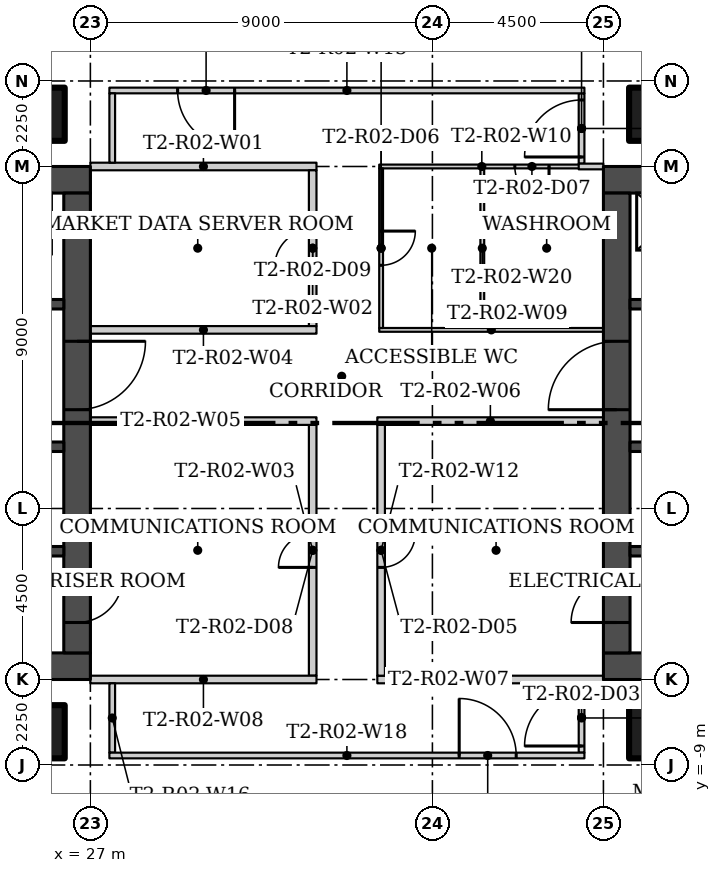
"""IFC4 building model, lengths in metres.
Left out: names, types, materials, properties, quantities, classifications, styles, units other than length and angle.
Written with IfcOpenShell. Run it as: python <this file> out.ifc"""

import sys

from ifc_helpers import new_model, si_unit, direction, frame, frame_2d, origin, origin_2d, place, context, subcontext, project, spatial, rectangle, hollow_rectangle, extrude, element, fill, save


model = new_model("IFC4")
c1 = context("Model", 3, precision=1e-05, world=origin(), true_north=direction((0.0, 1.0)))
c2 = subcontext(c1, "Body", "Model", "MODEL_VIEW")
j1 = project(units=[si_unit("LENGTHUNIT", "METRE"), si_unit("PLANEANGLEUNIT", "RADIAN")], contexts=[c1])
p1 = place(None, origin())
s1 = spatial("IfcSite", under=j1, at=p1, CompositionType="ELEMENT")
p2 = place(p1, origin())
s2 = spatial("IfcBuilding", under=s1, at=p2, CompositionType="ELEMENT")
p3 = place(p2, frame((0.0, 0.0, 33.0)))
s3 = spatial("IfcBuildingStorey", under=s2, at=p3, CompositionType="ELEMENT", Elevation=33.0)
for number, where in (
    (1, (25.625, 8.125, 0.0)),
    (2, (41.875, 8.125, 0.0)),
    (3, (25.625, -8.125, 0.0)),
    (4, (41.875, -8.125, 0.0)),
):
    element("IfcColumn", number, at=place(p3, frame(where)), inside=s3, PredefinedType="COLUMN", context=c2, shape_type="SweptSolid", body=[
        extrude(hollow_rectangle(XDim=1.4, YDim=1.4, WallThickness=0.05, at=origin_2d()), origin(), (0.0, 0.0, 1.0), 4.15),
    ])
p4 = place(p3, frame((32.95, 6.75, 0.0), z_axis=(0.0, 0.0, 1.0), x_axis=(-1.0, 0.0, 0.0)))
e5 = element("IfcWall", 5, at=p4, inside=s3, PredefinedType="PARTITIONING", context=c2, shape_type="SweptSolid", body=[
    extrude(rectangle(XDim=5.95, YDim=0.2, at=frame_2d((2.975, 0.0))), origin(), (0.0, 0.0, 1.0), 4.15),
])
p5 = place(p3, frame((32.85, 2.55, 0.0), z_axis=(0.0, 0.0, 1.0), x_axis=(0.0, 1.0, 0.0)))
e6 = element("IfcWall", 6, at=p5, inside=s3, PredefinedType="PARTITIONING", context=c2, shape_type="SweptSolid", body=[
    extrude(rectangle(XDim=4.1, YDim=0.2, at=frame_2d((2.05, 0.0))), origin(), (0.0, 0.0, 1.0), 4.15),
])
p6 = place(p5, frame((1.55, 0.0, 0.0)))
e7 = element("IfcOpeningElement", 7, at=p6, cuts=e6, PredefinedType="OPENING", context=c2, shape_type="SweptSolid", body=[
    extrude(rectangle(XDim=1.0, YDim=2.1, at=frame_2d((0.5, 1.05))), frame((0.0, 0.11, 0.0), z_axis=(0.0, -1.0, 0.0), x_axis=(1.0, 0.0, 0.0)), (0.0, 0.0, 1.0), 0.22),
])
p7 = place(p3, frame((32.85, -6.65, 0.0), z_axis=(0.0, 0.0, 1.0), x_axis=(0.0, 1.0, 0.0)))
e8 = element("IfcWall", 8, at=p7, inside=s3, PredefinedType="PARTITIONING", context=c2, shape_type="SweptSolid", body=[
    extrude(rectangle(XDim=6.6, YDim=0.2, at=frame_2d((3.3, 0.0))), origin(), (0.0, 0.0, 1.0), 4.15),
])
p8 = place(p7, frame((2.85, 0.0, 0.0)))
e9 = element("IfcOpeningElement", 9, at=p8, cuts=e8, PredefinedType="OPENING", context=c2, shape_type="SweptSolid", body=[
    extrude(rectangle(XDim=0.9, YDim=2.1, at=frame_2d((0.45, 1.05))), frame((0.0, 0.11, 0.0), z_axis=(0.0, -1.0, 0.0), x_axis=(1.0, 0.0, 0.0)), (0.0, 0.0, 1.0), 0.22),
])
p9 = place(p3, frame((27.0, 2.45, 0.0)))
e10 = element("IfcWall", 10, at=p9, inside=s3, PredefinedType="PARTITIONING", context=c2, shape_type="SweptSolid", body=[
    extrude(rectangle(XDim=5.95, YDim=0.2, at=frame_2d((2.975, 0.0))), origin(), (0.0, 0.0, 1.0), 4.15),
])
for number, where, z_axis, x_axis in (
    (11, (32.95, 0.05, 0.0), (0.0, 0.0, 1.0), (-1.0, 0.0, 0.0)),
    (12, (40.5, 0.05, 0.0), (0.0, 0.0, 1.0), (-1.0, 0.0, 0.0)),
):
    element("IfcWall", number, at=place(p3, frame(where, z_axis=z_axis, x_axis=x_axis)), inside=s3, PredefinedType="PARTITIONING", context=c2, shape_type="SweptSolid", body=[
        extrude(rectangle(XDim=5.95, YDim=0.2, at=frame_2d((2.975, 0.0))), origin(), (0.0, 0.0, 1.0), 4.15),
    ])
for number, where in (
    (13, (34.55, -6.75, 0.0)),
    (14, (27.0, -6.75, 0.0)),
):
    element("IfcWall", number, at=place(p3, frame(where)), inside=s3, PredefinedType="PARTITIONING", context=c2, shape_type="SweptSolid", body=[
        extrude(rectangle(XDim=5.95, YDim=0.2, at=frame_2d((2.975, 0.0))), origin(), (0.0, 0.0, 1.0), 4.15),
    ])
p10 = place(p3, frame((34.6, 2.45, 0.0)))
e15 = element("IfcWall", 15, at=p10, inside=s3, PredefinedType="PARTITIONING", context=c2, shape_type="SweptSolid", body=[
    extrude(rectangle(XDim=5.9, YDim=0.1, at=frame_2d((2.95, 0.0))), origin(), (0.0, 0.0, 1.0), 4.15),
])
p11 = place(p3, frame((40.0, 6.75, 0.0), z_axis=(0.0, 0.0, 1.0), x_axis=(-1.0, 0.0, 0.0)))
e16 = element("IfcWall", 16, at=p11, inside=s3, PredefinedType="PARTITIONING", context=c2, shape_type="SweptSolid", body=[
    extrude(rectangle(XDim=5.399, YDim=0.1, at=frame_2d((2.7, 0.0))), origin(), (0.0, 0.0, 1.0), 4.15),
])
p12 = place(p11, frame((0.931, 0.0, 0.0)))
e17 = element("IfcOpeningElement", 17, at=p12, cuts=e16, PredefinedType="OPENING", context=c2, shape_type="SweptSolid", body=[
    extrude(rectangle(XDim=0.9, YDim=2.1, at=frame_2d((0.45, 1.05))), frame((0.0, 0.06, 0.0), z_axis=(0.0, -1.0, 0.0), x_axis=(1.0, 0.0, 0.0)), (0.0, 0.0, 1.0), 0.12),
])
p13 = place(p3, frame((34.65, 6.7, 0.0), z_axis=(0.0, 0.0, 1.0), x_axis=(0.0, -1.0, 0.0)))
e18 = element("IfcWall", 18, at=p13, inside=s3, PredefinedType="PARTITIONING", context=c2, shape_type="SweptSolid", body=[
    extrude(rectangle(XDim=4.2, YDim=0.1, at=frame_2d((2.1, 0.0))), origin(), (0.0, 0.0, 1.0), 4.15),
])
p14 = place(p13, frame((1.65, 0.0, 0.0)))
e19 = element("IfcOpeningElement", 19, at=p14, cuts=e18, PredefinedType="OPENING", context=c2, shape_type="SweptSolid", body=[
    extrude(rectangle(XDim=0.9, YDim=2.1, at=frame_2d((0.45, 1.05))), frame((0.0, 0.06, 0.0), z_axis=(0.0, -1.0, 0.0), x_axis=(1.0, 0.0, 0.0)), (0.0, 0.0, 1.0), 0.12),
])
p15 = place(p3, frame((34.65, -0.05, 0.0), z_axis=(0.0, 0.0, 1.0), x_axis=(0.0, -1.0, 0.0)))
e20 = element("IfcWall", 20, at=p15, inside=s3, PredefinedType="PARTITIONING", context=c2, shape_type="SweptSolid", body=[
    extrude(rectangle(XDim=6.6, YDim=0.2, at=frame_2d((3.3, 0.0))), origin(), (0.0, 0.0, 1.0), 4.15),
])
p16 = place(p15, frame((2.85, 0.0, 0.0)))
e21 = element("IfcOpeningElement", 21, at=p16, cuts=e20, PredefinedType="OPENING", context=c2, shape_type="SweptSolid", body=[
    extrude(rectangle(XDim=0.9, YDim=2.1, at=frame_2d((0.45, 1.05))), frame((0.0, 0.11, 0.0), z_axis=(0.0, -1.0, 0.0), x_axis=(1.0, 0.0, 0.0)), (0.0, 0.0, 1.0), 0.22),
])
p17 = place(p3, frame((39.925, 6.825, 0.0), z_axis=(0.0, 0.0, 1.0), x_axis=(0.0, 1.0, 0.0)))
e22 = element("IfcWall", 22, at=p17, inside=s3, PredefinedType="PARTITIONING", context=c2, shape_type="SweptSolid", body=[
    extrude(rectangle(XDim=1.85, YDim=0.15, at=frame_2d((0.925, 0.0))), origin(), (0.0, 0.0, 1.0), 4.15),
])
p18 = place(p17, frame((0.175, 0.0, 0.0)))
e23 = element("IfcOpeningElement", 23, at=p18, cuts=e22, PredefinedType="OPENING", context=c2, shape_type="SweptSolid", body=[
    extrude(rectangle(XDim=1.5, YDim=2.4, at=frame_2d((0.75, 1.2))), frame((0.0, 0.085, 0.0), z_axis=(0.0, -1.0, 0.0), x_axis=(1.0, 0.0, 0.0)), (0.0, 0.0, 1.0), 0.17),
])
p19 = place(p3, frame((39.925, -8.675, 0.0), z_axis=(0.0, 0.0, 1.0), x_axis=(0.0, 1.0, 0.0)))
e24 = element("IfcWall", 24, at=p19, inside=s3, PredefinedType="PARTITIONING", context=c2, shape_type="SweptSolid", body=[
    extrude(rectangle(XDim=1.825, YDim=0.15, at=frame_2d((0.913, 0.0))), origin(), (0.0, 0.0, 1.0), 4.15),
])
p20 = place(p19, frame((0.175, 0.0, 0.0)))
e25 = element("IfcOpeningElement", 25, at=p20, cuts=e24, PredefinedType="OPENING", context=c2, shape_type="SweptSolid", body=[
    extrude(rectangle(XDim=1.5, YDim=2.4, at=frame_2d((0.75, 1.2))), frame((0.0, 0.085, 0.0), z_axis=(0.0, -1.0, 0.0), x_axis=(1.0, 0.0, 0.0)), (0.0, 0.0, 1.0), 0.17),
])
p21 = place(p3, frame((40.0, 8.75, 0.0), z_axis=(0.0, 0.0, 1.0), x_axis=(-1.0, 0.0, 0.0)))
e26 = element("IfcWall", 26, at=p21, inside=s3, PredefinedType="PARTITIONING", context=c2, shape_type="SweptSolid", body=[
    extrude(rectangle(XDim=12.5, YDim=0.15, at=frame_2d((6.25, 0.0))), origin(), (0.0, 0.0, 1.0), 4.15),
])
p22 = place(p21, frame((9.205, 0.0, 0.0)))
e27 = element("IfcOpeningElement", 27, at=p22, cuts=e26, PredefinedType="OPENING", context=c2, shape_type="SweptSolid", body=[
    extrude(rectangle(XDim=1.5, YDim=2.4, at=frame_2d((0.75, 1.2))), frame((0.0, 0.085, 0.0), z_axis=(0.0, -1.0, 0.0), x_axis=(1.0, 0.0, 0.0)), (0.0, 0.0, 1.0), 0.17),
])
for number, where, z_axis, x_axis in (
    (28, (27.575, -6.85, 0.0), (0.0, 0.0, 1.0), (0.0, -1.0, 0.0)),
    (29, (27.575, 8.675, 0.0), (0.0, 0.0, 1.0), (0.0, -1.0, 0.0)),
):
    element("IfcWall", number, at=place(p3, frame(where, z_axis=z_axis, x_axis=x_axis)), inside=s3, PredefinedType="PARTITIONING", context=c2, shape_type="SweptSolid", body=[
        extrude(rectangle(XDim=1.825, YDim=0.15, at=frame_2d((0.913, 0.0))), origin(), (0.0, 0.0, 1.0), 4.15),
    ])
p23 = place(p3, frame((27.5, -8.75, 0.0)))
e30 = element("IfcWall", 30, at=p23, inside=s3, PredefinedType="PARTITIONING", context=c2, shape_type="SweptSolid", body=[
    extrude(rectangle(XDim=12.5, YDim=0.15, at=frame_2d((6.25, 0.0))), origin(), (0.0, 0.0, 1.0), 4.15),
])
p24 = place(p23, frame((9.205, 0.0, 0.0)))
e31 = element("IfcOpeningElement", 31, at=p24, cuts=e30, PredefinedType="OPENING", context=c2, shape_type="SweptSolid", body=[
    extrude(rectangle(XDim=1.5, YDim=2.4, at=frame_2d((0.75, 1.2))), frame((0.0, 0.085, 0.0), z_axis=(0.0, -1.0, 0.0), x_axis=(1.0, 0.0, 0.0)), (0.0, 0.0, 1.0), 0.17),
])
p25 = place(p3, frame((37.312, 6.7, 0.0), z_axis=(0.0, 0.0, 1.0), x_axis=(0.0, -1.0, 0.0)))
e32 = element("IfcWall", 32, at=p25, inside=s3, PredefinedType="PARTITIONING", context=c2, shape_type="SweptSolid", body=[
    extrude(rectangle(XDim=4.2, YDim=0.1, at=frame_2d((2.1, 0.0))), origin(), (0.0, 0.0, 1.0), 4.15),
])
p26 = place(p3, frame((40.5, 6.75, 0.0), z_axis=(0.0, 0.0, 1.0), x_axis=(-1.0, 0.0, 0.0)))
e33 = element("IfcWall", 33, at=p26, inside=s3, PredefinedType="PARTITIONING", context=c2, shape_type="SweptSolid", body=[
    extrude(rectangle(XDim=0.65, YDim=0.15, at=frame_2d((0.325, 0.0))), origin(), (0.0, 0.0, 1.0), 4.15),
])
for number, where in (
    (34, (13.5, -6.4, 0.0)),
    (35, (13.5, 6.4, 0.0)),
):
    element("IfcWall", number, at=place(p3, frame(where)), inside=s3, PredefinedType="SHEAR", context=c2, shape_type="SweptSolid", body=[
        extrude(rectangle(XDim=13.5, YDim=0.7, at=frame_2d((6.75, 0.0))), origin(), (0.0, 0.0, 1.0), 4.15),
    ])
p27 = place(p3, frame((26.65, 6.05, 0.0), z_axis=(0.0, 0.0, 1.0), x_axis=(0.0, -1.0, 0.0)))
e36 = element("IfcWall", 36, at=p27, inside=s3, PredefinedType="SHEAR", context=c2, shape_type="SweptSolid", body=[
    extrude(rectangle(XDim=12.1, YDim=0.7, at=frame_2d((6.05, 0.0))), origin(), (0.0, 0.0, 1.0), 4.15),
])
p28 = place(p27, frame((10.1, 0.0, 0.0)))
e37 = element("IfcOpeningElement", 37, at=p28, cuts=e36, PredefinedType="OPENING", context=c2, shape_type="SweptSolid", body=[
    extrude(rectangle(XDim=1.2, YDim=2.1, at=frame_2d((0.6, 1.05))), frame((0.0, 0.36, 0.0), z_axis=(0.0, -1.0, 0.0), x_axis=(1.0, 0.0, 0.0)), (0.0, 0.0, 1.0), 0.72),
])
p29 = place(p27, frame((3.9, 0.0, 0.0)))
e38 = element("IfcOpeningElement", 38, at=p29, cuts=e36, PredefinedType="OPENING", context=c2, shape_type="SweptSolid", body=[
    extrude(rectangle(XDim=1.8, YDim=2.4, at=frame_2d((0.9, 1.2))), frame((0.0, 0.36, 0.0), z_axis=(0.0, -1.0, 0.0), x_axis=(1.0, 0.0, 0.0)), (0.0, 0.0, 1.0), 0.72),
])
p30 = place(p3, frame((26.3, -3.375, 0.0), z_axis=(0.0, 0.0, 1.0), x_axis=(-1.0, 0.0, 0.0)))
e39 = element("IfcWall", 39, at=p30, inside=s3, PredefinedType="SHEAR", context=c2, shape_type="SweptSolid", body=[
    extrude(rectangle(XDim=12.1, YDim=0.25, at=frame_2d((6.05, 0.0))), origin(), (0.0, 0.0, 1.0), 4.15),
])
p31 = place(p30, frame((10.95, 0.0, 0.0)))
e40 = element("IfcOpeningElement", 40, at=p31, cuts=e39, PredefinedType="OPENING", context=c2, shape_type="SweptSolid", body=[
    extrude(rectangle(XDim=1.1, YDim=2.1, at=frame_2d((0.55, 1.05))), frame((0.0, 0.135, 0.0), z_axis=(0.0, -1.0, 0.0), x_axis=(1.0, 0.0, 0.0)), (0.0, 0.0, 1.0), 0.27),
])
p32 = place(p3, frame((26.3, -0.625, 0.0), z_axis=(0.0, 0.0, 1.0), x_axis=(-1.0, 0.0, 0.0)))
e41 = element("IfcWall", 41, at=p32, inside=s3, PredefinedType="SHEAR", context=c2, shape_type="SweptSolid", body=[
    extrude(rectangle(XDim=12.1, YDim=0.25, at=frame_2d((6.05, 0.0))), origin(), (0.0, 0.0, 1.0), 4.15),
])
p33 = place(p32, frame((8.65, 0.0, 0.0)))
e42 = element("IfcOpeningElement", 42, at=p33, cuts=e41, PredefinedType="OPENING", context=c2, shape_type="SweptSolid", body=[
    extrude(rectangle(XDim=1.2, YDim=2.1, at=frame_2d((0.6, 1.05))), frame((0.0, 0.135, 0.0), z_axis=(0.0, -1.0, 0.0), x_axis=(1.0, 0.0, 0.0)), (0.0, 0.0, 1.0), 0.27),
])
p34 = place(p32, frame((1.175, 0.0, 0.0)))
e43 = element("IfcOpeningElement", 43, at=p34, cuts=e41, PredefinedType="OPENING", context=c2, shape_type="SweptSolid", body=[
    extrude(rectangle(XDim=0.9, YDim=2.1, at=frame_2d((0.45, 1.05))), frame((0.0, 0.135, 0.0), z_axis=(0.0, -1.0, 0.0), x_axis=(1.0, 0.0, 0.0)), (0.0, 0.0, 1.0), 0.27),
])
p35 = place(p3, frame((14.2, 3.125, 0.0)))
e44 = element("IfcWall", 44, at=p35, inside=s3, PredefinedType="SHEAR", context=c2, shape_type="SweptSolid", body=[
    extrude(rectangle(XDim=12.1, YDim=0.25, at=frame_2d((6.05, 0.0))), origin(), (0.0, 0.0, 1.0), 4.15),
])
p36 = place(p35, frame((0.85, 0.0, 0.0)))
e45 = element("IfcOpeningElement", 45, at=p36, cuts=e44, PredefinedType="OPENING", context=c2, shape_type="SweptSolid", body=[
    extrude(rectangle(XDim=1.1, YDim=2.1, at=frame_2d((0.55, 1.05))), frame((0.0, 0.135, 0.0), z_axis=(0.0, -1.0, 0.0), x_axis=(1.0, 0.0, 0.0)), (0.0, 0.0, 1.0), 0.27),
])
p37 = place(p35, frame((3.9, 0.0, 0.0)))
e46 = element("IfcOpeningElement", 46, at=p37, cuts=e44, PredefinedType="OPENING", context=c2, shape_type="SweptSolid", body=[
    extrude(rectangle(XDim=1.1, YDim=2.1, at=frame_2d((0.55, 1.05))), frame((0.0, 0.135, 0.0), z_axis=(0.0, -1.0, 0.0), x_axis=(1.0, 0.0, 0.0)), (0.0, 0.0, 1.0), 0.27),
])
for number, where, z_axis, x_axis in (
    (47, (54.0, -6.4, 0.0), (0.0, 0.0, 1.0), (-1.0, 0.0, 0.0)),
    (48, (54.0, 6.4, 0.0), (0.0, 0.0, 1.0), (-1.0, 0.0, 0.0)),
):
    element("IfcWall", number, at=place(p3, frame(where, z_axis=z_axis, x_axis=x_axis)), inside=s3, PredefinedType="SHEAR", context=c2, shape_type="SweptSolid", body=[
        extrude(rectangle(XDim=13.5, YDim=0.7, at=frame_2d((6.75, 0.0))), origin(), (0.0, 0.0, 1.0), 4.15),
    ])
p38 = place(p3, frame((40.85, -6.05, 0.0), z_axis=(0.0, 0.0, 1.0), x_axis=(0.0, 1.0, 0.0)))
e49 = element("IfcWall", 49, at=p38, inside=s3, PredefinedType="SHEAR", context=c2, shape_type="SweptSolid", body=[
    extrude(rectangle(XDim=12.1, YDim=0.7, at=frame_2d((6.05, 0.0))), origin(), (0.0, 0.0, 1.0), 4.15),
])
p39 = place(p38, frame((0.8, 0.0, 0.0)))
e50 = element("IfcOpeningElement", 50, at=p39, cuts=e49, PredefinedType="OPENING", context=c2, shape_type="SweptSolid", body=[
    extrude(rectangle(XDim=1.2, YDim=2.1, at=frame_2d((0.6, 1.05))), frame((0.0, 0.36, 0.0), z_axis=(0.0, -1.0, 0.0), x_axis=(1.0, 0.0, 0.0)), (0.0, 0.0, 1.0), 0.72),
])
p40 = place(p38, frame((6.4, 0.0, 0.0)))
e51 = element("IfcOpeningElement", 51, at=p40, cuts=e49, PredefinedType="OPENING", context=c2, shape_type="SweptSolid", body=[
    extrude(rectangle(XDim=1.8, YDim=2.4, at=frame_2d((0.9, 1.2))), frame((0.0, 0.36, 0.0), z_axis=(0.0, -1.0, 0.0), x_axis=(1.0, 0.0, 0.0)), (0.0, 0.0, 1.0), 0.72),
])
p41 = place(p3, frame((53.3, -3.375, 0.0), z_axis=(0.0, 0.0, 1.0), x_axis=(-1.0, 0.0, 0.0)))
e52 = element("IfcWall", 52, at=p41, inside=s3, PredefinedType="SHEAR", context=c2, shape_type="SweptSolid", body=[
    extrude(rectangle(XDim=12.1, YDim=0.25, at=frame_2d((6.05, 0.0))), origin(), (0.0, 0.0, 1.0), 4.15),
])
p42 = place(p41, frame((0.05, 0.0, 0.0)))
e53 = element("IfcOpeningElement", 53, at=p42, cuts=e52, PredefinedType="OPENING", context=c2, shape_type="SweptSolid", body=[
    extrude(rectangle(XDim=1.1, YDim=2.1, at=frame_2d((0.55, 1.05))), frame((0.0, 0.135, 0.0), z_axis=(0.0, -1.0, 0.0), x_axis=(1.0, 0.0, 0.0)), (0.0, 0.0, 1.0), 0.27),
])
p43 = place(p3, frame((53.3, -0.625, 0.0), z_axis=(0.0, 0.0, 1.0), x_axis=(-1.0, 0.0, 0.0)))
e54 = element("IfcWall", 54, at=p43, inside=s3, PredefinedType="SHEAR", context=c2, shape_type="SweptSolid", body=[
    extrude(rectangle(XDim=12.1, YDim=0.25, at=frame_2d((6.05, 0.0))), origin(), (0.0, 0.0, 1.0), 4.15),
])
p44 = place(p43, frame((2.25, 0.0, 0.0)))
e55 = element("IfcOpeningElement", 55, at=p44, cuts=e54, PredefinedType="OPENING", context=c2, shape_type="SweptSolid", body=[
    extrude(rectangle(XDim=1.2, YDim=2.1, at=frame_2d((0.6, 1.05))), frame((0.0, 0.135, 0.0), z_axis=(0.0, -1.0, 0.0), x_axis=(1.0, 0.0, 0.0)), (0.0, 0.0, 1.0), 0.27),
])
p45 = place(p43, frame((10.025, 0.0, 0.0)))
e56 = element("IfcOpeningElement", 56, at=p45, cuts=e54, PredefinedType="OPENING", context=c2, shape_type="SweptSolid", body=[
    extrude(rectangle(XDim=0.9, YDim=2.1, at=frame_2d((0.45, 1.05))), frame((0.0, 0.135, 0.0), z_axis=(0.0, -1.0, 0.0), x_axis=(1.0, 0.0, 0.0)), (0.0, 0.0, 1.0), 0.27),
])
p46 = place(p3, frame((46.0, 3.125, 0.0), z_axis=(0.0, 0.0, 1.0), x_axis=(-1.0, 0.0, 0.0)))
e57 = element("IfcWall", 57, at=p46, inside=s3, PredefinedType="SHEAR", context=c2, shape_type="SweptSolid", body=[
    extrude(rectangle(XDim=4.8, YDim=0.25, at=frame_2d((2.4, 0.0))), origin(), (0.0, 0.0, 1.0), 4.15),
])
p47 = place(p46, frame((0.775, 0.0, 0.0)))
e58 = element("IfcOpeningElement", 58, at=p47, cuts=e57, PredefinedType="OPENING", context=c2, shape_type="SweptSolid", body=[
    extrude(rectangle(XDim=1.1, YDim=2.1, at=frame_2d((0.55, 1.05))), frame((0.0, 0.135, 0.0), z_axis=(0.0, -1.0, 0.0), x_axis=(1.0, 0.0, 0.0)), (0.0, 0.0, 1.0), 0.27),
])
p48 = place(p24, origin())
e59 = element("IfcDoor", 59, at=p48, inside=s3, OperationType="DOUBLE_DOOR_SINGLE_SWING", PredefinedType="DOOR", context=c2, shape_type="SweptSolid", body=[
    extrude(rectangle(XDim=1.5, YDim=2.4, at=frame_2d((0.75, 1.2))), frame((0.0, 0.025, 0.0), z_axis=(0.0, -1.0, 0.0), x_axis=(1.0, 0.0, 0.0)), (0.0, 0.0, 1.0), 0.05),
])
fill(e31, e59)
p49 = place(p20, origin())
e60 = element("IfcDoor", 60, at=p49, inside=s3, OperationType="DOUBLE_DOOR_SINGLE_SWING", PredefinedType="DOOR", context=c2, shape_type="SweptSolid", body=[
    extrude(rectangle(XDim=1.5, YDim=2.4, at=frame_2d((0.75, 1.2))), frame((0.0, 0.025, 0.0), z_axis=(0.0, -1.0, 0.0), x_axis=(1.0, 0.0, 0.0)), (0.0, 0.0, 1.0), 0.05),
])
fill(e25, e60)
p50 = place(p18, origin())
e61 = element("IfcDoor", 61, at=p50, inside=s3, OperationType="DOUBLE_DOOR_SINGLE_SWING", PredefinedType="DOOR", context=c2, shape_type="SweptSolid", body=[
    extrude(rectangle(XDim=1.5, YDim=2.4, at=frame_2d((0.75, 1.2))), frame((0.0, 0.025, 0.0), z_axis=(0.0, -1.0, 0.0), x_axis=(1.0, 0.0, 0.0)), (0.0, 0.0, 1.0), 0.05),
])
fill(e23, e61)
p51 = place(p16, origin())
e62 = element("IfcDoor", 62, at=p51, inside=s3, OperationType="SINGLE_SWING_RIGHT", PredefinedType="DOOR", context=c2, shape_type="SweptSolid", body=[
    extrude(rectangle(XDim=0.9, YDim=2.1, at=frame_2d((0.45, 1.05))), frame((0.0, 0.025, 0.0), z_axis=(0.0, -1.0, 0.0), x_axis=(1.0, 0.0, 0.0)), (0.0, 0.0, 1.0), 0.05),
])
fill(e21, e62)
p52 = place(p14, origin())
e63 = element("IfcDoor", 63, at=p52, inside=s3, OperationType="SINGLE_SWING_RIGHT", PredefinedType="DOOR", context=c2, shape_type="SweptSolid", body=[
    extrude(rectangle(XDim=0.9, YDim=2.1, at=frame_2d((0.45, 1.05))), frame((0.0, 0.025, 0.0), z_axis=(0.0, -1.0, 0.0), x_axis=(1.0, 0.0, 0.0)), (0.0, 0.0, 1.0), 0.05),
])
fill(e19, e63)
p53 = place(p12, origin())
e64 = element("IfcDoor", 64, at=p53, inside=s3, OperationType="SINGLE_SWING_RIGHT", PredefinedType="DOOR", context=c2, shape_type="SweptSolid", body=[
    extrude(rectangle(XDim=0.9, YDim=2.1, at=frame_2d((0.45, 1.05))), frame((0.0, 0.025, 0.0), z_axis=(0.0, -1.0, 0.0), x_axis=(1.0, 0.0, 0.0)), (0.0, 0.0, 1.0), 0.05),
])
fill(e17, e64)
p54 = place(p8, origin())
e65 = element("IfcDoor", 65, at=p54, inside=s3, OperationType="SINGLE_SWING_RIGHT", PredefinedType="DOOR", context=c2, shape_type="SweptSolid", body=[
    extrude(rectangle(XDim=0.9, YDim=2.1, at=frame_2d((0.45, 1.05))), frame((0.0, 0.025, 0.0), z_axis=(0.0, -1.0, 0.0), x_axis=(1.0, 0.0, 0.0)), (0.0, 0.0, 1.0), 0.05),
])
fill(e9, e65)
p55 = place(p6, origin())
e66 = element("IfcDoor", 66, at=p55, inside=s3, OperationType="SINGLE_SWING_RIGHT", PredefinedType="DOOR", context=c2, shape_type="SweptSolid", body=[
    extrude(rectangle(XDim=1.0, YDim=2.1, at=frame_2d((0.5, 1.05))), frame((0.0, 0.025, 0.0), z_axis=(0.0, -1.0, 0.0), x_axis=(1.0, 0.0, 0.0)), (0.0, 0.0, 1.0), 0.05),
])
fill(e7, e66)
p56 = place(p22, origin())
e67 = element("IfcDoor", 67, at=p56, inside=s3, OperationType="DOUBLE_DOOR_SINGLE_SWING", PredefinedType="DOOR", context=c2, shape_type="SweptSolid", body=[
    extrude(rectangle(XDim=1.5, YDim=2.4, at=frame_2d((0.75, 1.2))), frame((0.0, 0.025, 0.0), z_axis=(0.0, -1.0, 0.0), x_axis=(1.0, 0.0, 0.0)), (0.0, 0.0, 1.0), 0.05),
])
fill(e27, e67)
p57 = place(p28, origin())
e68 = element("IfcDoor", 68, at=p57, inside=s3, OperationType="SINGLE_SWING_RIGHT", PredefinedType="DOOR", context=c2, shape_type="SweptSolid", body=[
    extrude(rectangle(XDim=1.2, YDim=2.1, at=frame_2d((0.6, 1.05))), frame((0.0, 0.025, 0.0), z_axis=(0.0, -1.0, 0.0), x_axis=(1.0, 0.0, 0.0)), (0.0, 0.0, 1.0), 0.05),
])
fill(e37, e68)
p58 = place(p29, origin())
e69 = element("IfcDoor", 69, at=p58, inside=s3, OperationType="DOUBLE_DOOR_SINGLE_SWING", PredefinedType="DOOR", context=c2, shape_type="SweptSolid", body=[
    extrude(rectangle(XDim=1.8, YDim=2.4, at=frame_2d((0.9, 1.2))), frame((0.0, 0.025, 0.0), z_axis=(0.0, -1.0, 0.0), x_axis=(1.0, 0.0, 0.0)), (0.0, 0.0, 1.0), 0.05),
])
fill(e38, e69)
p59 = place(p39, origin())
e70 = element("IfcDoor", 70, at=p59, inside=s3, OperationType="SINGLE_SWING_LEFT", PredefinedType="DOOR", context=c2, shape_type="SweptSolid", body=[
    extrude(rectangle(XDim=1.2, YDim=2.1, at=frame_2d((0.6, 1.05))), frame((0.0, 0.025, 0.0), z_axis=(0.0, -1.0, 0.0), x_axis=(1.0, 0.0, 0.0)), (0.0, 0.0, 1.0), 0.05),
])
fill(e50, e70)
p60 = place(p40, origin())
e71 = element("IfcDoor", 71, at=p60, inside=s3, OperationType="DOUBLE_DOOR_SINGLE_SWING", PredefinedType="DOOR", context=c2, shape_type="SweptSolid", body=[
    extrude(rectangle(XDim=1.8, YDim=2.4, at=frame_2d((0.9, 1.2))), frame((0.0, 0.025, 0.0), z_axis=(0.0, -1.0, 0.0), x_axis=(1.0, 0.0, 0.0)), (0.0, 0.0, 1.0), 0.05),
])
fill(e51, e71)
save(model, sys.argv[1])
